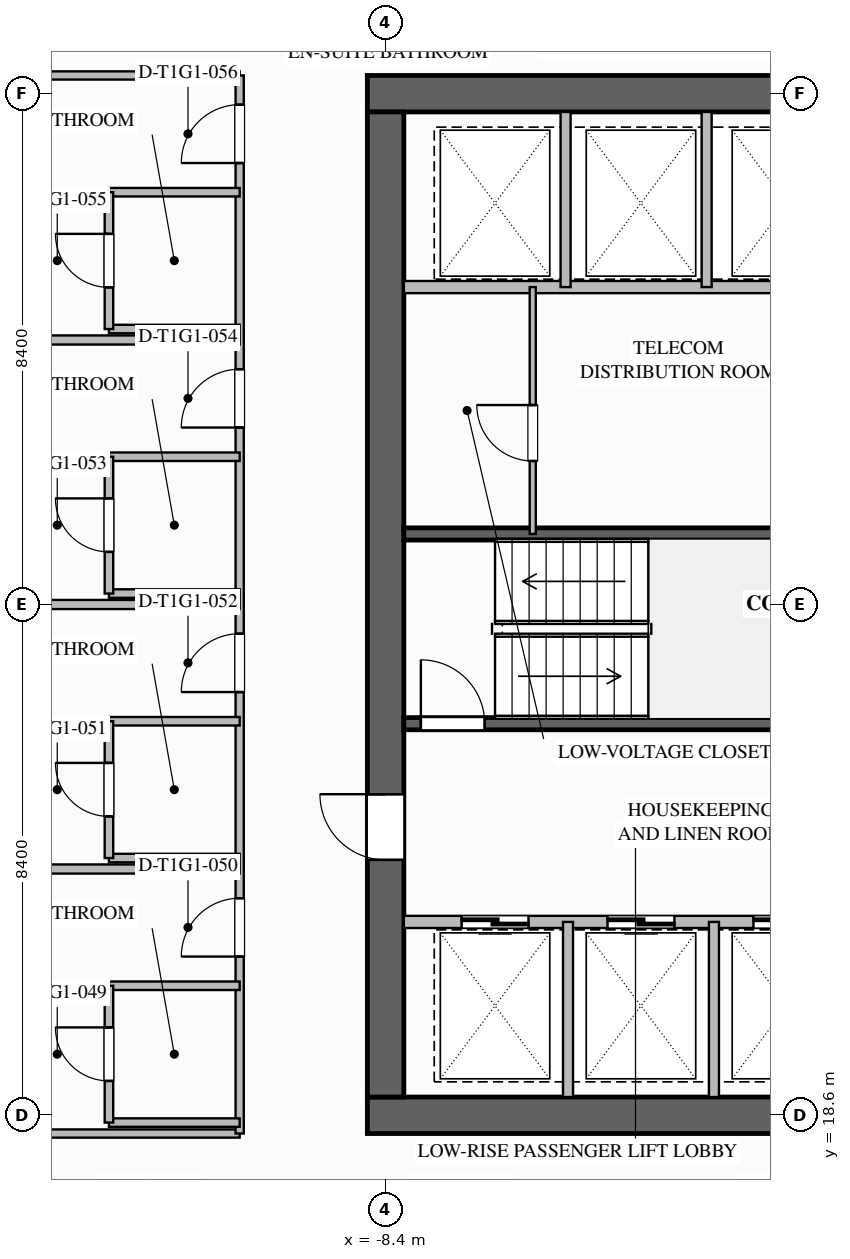
"""IFC4 building model, lengths in metres.
Left out: names, types, materials, properties, quantities, classifications, styles, units other than length and angle.
Written with IfcOpenShell. Run it as: python <this file> out.ifc"""

import sys

from ifc_helpers import new_model, si_unit, direction, frame, frame_2d, origin, place, context, subcontext, project, spatial, rectangle, extrude, element, fill, save


model = new_model("IFC4")
c1 = context("Model", 3, precision=1e-05, world=origin(), true_north=direction((0.0, 1.0)))
c2 = subcontext(c1, "Body", "Model", "MODEL_VIEW")
j1 = project(units=[si_unit("LENGTHUNIT", "METRE"), si_unit("PLANEANGLEUNIT", "RADIAN")], contexts=[c1])
p1 = place(None, origin())
s1 = spatial("IfcSite", under=j1, at=p1, CompositionType="ELEMENT")
p2 = place(p1, origin())
s2 = spatial("IfcBuilding", under=s1, at=p2, CompositionType="ELEMENT")
p3 = place(p2, frame((0.0, 0.0, 36.7)))
s3 = spatial("IfcBuildingStorey", under=s2, at=p3, CompositionType="ELEMENT", Elevation=36.7)
for number, where, z_axis, x_axis in (
    (1, (-8.7, 35.4, 0.0), (0.0, 0.0, 1.0), (1.0, 0.0, 0.0)),
    (2, (8.7, 18.6, 0.0), (0.0, 0.0, 1.0), (-1.0, 0.0, 0.0)),
):
    element("IfcWall", number, at=place(p3, frame(where, z_axis=z_axis, x_axis=x_axis)), inside=s3, PredefinedType="SHEAR", context=c2, shape_type="SweptSolid", body=[
        extrude(rectangle(XDim=17.4, YDim=0.6, at=frame_2d((8.7, 0.0))), origin(), (0.0, 0.0, 1.0), 3.5),
    ])
p4 = place(p3, frame((-8.4, 18.9, 0.0), z_axis=(0.0, 0.0, 1.0), x_axis=(0.0, 1.0, 0.0)))
e3 = element("IfcWall", 3, at=p4, inside=s3, PredefinedType="SHEAR", context=c2, shape_type="SweptSolid", body=[
    extrude(rectangle(XDim=16.2, YDim=0.6, at=frame_2d((8.1, 0.0))), origin(), (0.0, 0.0, 1.0), 3.5),
])
p5 = place(p4, frame((3.9, 0.0, 0.0)))
e4 = element("IfcOpeningElement", 4, at=p5, cuts=e3, PredefinedType="OPENING", context=c2, shape_type="SweptSolid", body=[
    extrude(rectangle(XDim=1.08, YDim=2.04, at=frame_2d((0.54, 1.02))), frame((0.0, 0.31, 0.0), z_axis=(0.0, -1.0, 0.0), x_axis=(1.0, 0.0, 0.0)), (0.0, 0.0, 1.0), 0.62),
])
p6 = place(p3, frame((-8.1, 25.04, 0.0), z_axis=(0.0, 0.0, 1.0), x_axis=(1.0, 0.0, 0.0)))
e5 = element("IfcWall", 5, at=p6, inside=s3, PredefinedType="SOLIDWALL", context=c2, shape_type="SweptSolid", body=[
    extrude(rectangle(XDim=8.1, YDim=0.2, at=frame_2d((4.05, 0.0))), origin(), (0.0, 0.0, 1.0), 3.24),
])
p7 = place(p6, frame((0.28, 0.0, 0.0)))
e6 = element("IfcOpeningElement", 6, at=p7, cuts=e5, PredefinedType="OPENING", context=c2, shape_type="SweptSolid", body=[
    extrude(rectangle(XDim=1.05, YDim=2.1, at=frame_2d((0.525, 1.05))), frame((0.0, 0.11, 0.0), z_axis=(0.0, -1.0, 0.0), x_axis=(1.0, 0.0, 0.0)), (0.0, 0.0, 1.0), 0.22),
])
p8 = place(p3, frame((-8.1, 28.16, 0.0), z_axis=(0.0, 0.0, 1.0), x_axis=(1.0, 0.0, 0.0)))
e7 = element("IfcWall", 7, at=p8, inside=s3, PredefinedType="SOLIDWALL", context=c2, shape_type="SweptSolid", body=[
    extrude(rectangle(XDim=8.1, YDim=0.2, at=frame_2d((4.05, 0.0))), origin(), (0.0, 0.0, 1.0), 3.24),
])
p9 = place(p3, frame((-8.1, 32.22, 0.0), z_axis=(0.0, 0.0, 1.0), x_axis=(1.0, 0.0, 0.0)))
e8 = element("IfcWall", 8, at=p9, inside=s3, PredefinedType="SOLIDWALL", context=c2, shape_type="SweptSolid", body=[
    extrude(rectangle(XDim=7.1, YDim=0.2, at=frame_2d((3.55, 0.0))), origin(), (0.0, 0.0, 1.0), 3.24),
])
for number, where, z_axis, x_axis in (
    (9, (-5.44, 32.22, 0.0), (0.0, 0.0, 1.0), (0.0, 1.0, 0.0)),
    (10, (-3.12, 32.22, 0.0), (0.0, 0.0, 1.0), (0.0, 1.0, 0.0)),
):
    element("IfcWall", number, at=place(p3, frame(where, z_axis=z_axis, x_axis=x_axis)), inside=s3, PredefinedType="PARTITIONING", context=c2, shape_type="SweptSolid", body=[
        extrude(rectangle(XDim=2.88, YDim=0.165, at=frame_2d((1.44, 0.0))), origin(), (0.0, 0.0, 1.0), 3.24),
    ])
p10 = place(p3, frame((-5.98, 28.16, 0.0), z_axis=(0.0, 0.0, 1.0), x_axis=(0.0, 1.0, 0.0)))
e11 = element("IfcWall", 11, at=p10, inside=s3, PredefinedType="PARTITIONING", context=c2, shape_type="SweptSolid", body=[
    extrude(rectangle(XDim=4.06, YDim=0.1, at=frame_2d((2.03, 0.0))), origin(), (0.0, 0.0, 1.0), 3.24),
])
p11 = place(p10, frame((1.2, 0.0, 0.0)))
e12 = element("IfcOpeningElement", 12, at=p11, cuts=e11, PredefinedType="OPENING", context=c2, shape_type="SweptSolid", body=[
    extrude(rectangle(XDim=0.92, YDim=2.1, at=frame_2d((0.46, 1.05))), frame((0.0, 0.06, 0.0), z_axis=(0.0, -1.0, 0.0), x_axis=(1.0, 0.0, 0.0)), (0.0, 0.0, 1.0), 0.12),
])
p12 = place(p3, frame((-0.55, 21.78, 0.0), z_axis=(0.0, 0.0, 1.0), x_axis=(-1.0, 0.0, 0.0)))
e13 = element("IfcWall", 13, at=p12, inside=s3, PredefinedType="SOLIDWALL", context=c2, shape_type="SweptSolid", body=[
    extrude(rectangle(XDim=7.55, YDim=0.2, at=frame_2d((3.775, 0.0))), origin(), (0.0, 0.0, 1.0), 3.24),
])
p13 = place(p12, frame((5.5, 0.0, 0.0)))
e14 = element("IfcOpeningElement", 14, at=p13, cuts=e13, PredefinedType="OPENING", context=c2, shape_type="SweptSolid", body=[
    extrude(rectangle(XDim=1.1, YDim=2.2, at=frame_2d((0.55, 1.1))), frame((0.0, 0.11, 0.0), z_axis=(0.0, -1.0, 0.0), x_axis=(1.0, 0.0, 0.0)), (0.0, 0.0, 1.0), 0.22),
])
p14 = place(p12, frame((3.1, 0.0, 0.0)))
e15 = element("IfcOpeningElement", 15, at=p14, cuts=e13, PredefinedType="OPENING", context=c2, shape_type="SweptSolid", body=[
    extrude(rectangle(XDim=1.1, YDim=2.2, at=frame_2d((0.55, 1.1))), frame((0.0, 0.11, 0.0), z_axis=(0.0, -1.0, 0.0), x_axis=(1.0, 0.0, 0.0)), (0.0, 0.0, 1.0), 0.22),
])
p15 = place(p12, frame((0.7, 0.0, 0.0)))
e16 = element("IfcOpeningElement", 16, at=p15, cuts=e13, PredefinedType="OPENING", context=c2, shape_type="SweptSolid", body=[
    extrude(rectangle(XDim=1.1, YDim=2.2, at=frame_2d((0.55, 1.1))), frame((0.0, 0.11, 0.0), z_axis=(0.0, -1.0, 0.0), x_axis=(1.0, 0.0, 0.0)), (0.0, 0.0, 1.0), 0.22),
])
for number, where, z_axis, x_axis in (
    (17, (-5.4, 18.9, 0.0), (0.0, 0.0, 1.0), (0.0, 1.0, 0.0)),
    (18, (-3.0, 18.9, 0.0), (0.0, 0.0, 1.0), (0.0, 1.0, 0.0)),
):
    element("IfcWall", number, at=place(p3, frame(where, z_axis=z_axis, x_axis=x_axis)), inside=s3, PredefinedType="PARTITIONING", context=c2, shape_type="SweptSolid", body=[
        extrude(rectangle(XDim=2.88, YDim=0.165, at=frame_2d((1.44, 0.0))), origin(), (0.0, 0.0, 1.0), 3.24),
    ])
for number, where, z_axis, x_axis in (
    (19, (-16.2, 18.3, 0.0), (0.0, 0.0, 1.0), (1.0, 0.0, 0.0)),
    (20, (-16.2, 35.7, 0.0), (0.0, 0.0, 1.0), (1.0, 0.0, 0.0)),
):
    element("IfcWall", number, at=place(p3, frame(where, z_axis=z_axis, x_axis=x_axis)), inside=s3, PredefinedType="PARTITIONING", context=c2, shape_type="SweptSolid", body=[
        extrude(rectangle(XDim=5.4, YDim=0.135, at=frame_2d((2.7, 0.0))), origin(), (0.0, 0.0, 1.0), 3.24),
    ])
p16 = place(p3, frame((-10.8, 18.3, 0.0), z_axis=(0.0, 0.0, 1.0), x_axis=(0.0, 1.0, 0.0)))
e21 = element("IfcWall", 21, at=p16, inside=s3, PredefinedType="PARTITIONING", context=c2, shape_type="SweptSolid", body=[
    extrude(rectangle(XDim=17.4, YDim=0.135, at=frame_2d((8.7, 0.0))), origin(), (0.0, 0.0, 1.0), 3.24),
])
p17 = place(p16, frame((2.91, 0.0, 0.0)))
e22 = element("IfcOpeningElement", 22, at=p17, cuts=e21, PredefinedType="OPENING", context=c2, shape_type="SweptSolid", body=[
    extrude(rectangle(XDim=0.96, YDim=2.15, at=frame_2d((0.48, 1.075))), frame((0.0, 0.077, 0.0), z_axis=(0.0, -1.0, 0.0), x_axis=(1.0, 0.0, 0.0)), (0.0, 0.0, 1.0), 0.155),
])
p18 = place(p16, frame((7.26, 0.0, 0.0)))
e23 = element("IfcOpeningElement", 23, at=p18, cuts=e21, PredefinedType="OPENING", context=c2, shape_type="SweptSolid", body=[
    extrude(rectangle(XDim=0.96, YDim=2.15, at=frame_2d((0.48, 1.075))), frame((0.0, 0.077, 0.0), z_axis=(0.0, -1.0, 0.0), x_axis=(1.0, 0.0, 0.0)), (0.0, 0.0, 1.0), 0.155),
])
p19 = place(p16, frame((11.61, 0.0, 0.0)))
e24 = element("IfcOpeningElement", 24, at=p19, cuts=e21, PredefinedType="OPENING", context=c2, shape_type="SweptSolid", body=[
    extrude(rectangle(XDim=0.96, YDim=2.15, at=frame_2d((0.48, 1.075))), frame((0.0, 0.077, 0.0), z_axis=(0.0, -1.0, 0.0), x_axis=(1.0, 0.0, 0.0)), (0.0, 0.0, 1.0), 0.155),
])
p20 = place(p16, frame((15.96, 0.0, 0.0)))
e25 = element("IfcOpeningElement", 25, at=p20, cuts=e21, PredefinedType="OPENING", context=c2, shape_type="SweptSolid", body=[
    extrude(rectangle(XDim=0.96, YDim=2.15, at=frame_2d((0.48, 1.075))), frame((0.0, 0.077, 0.0), z_axis=(0.0, -1.0, 0.0), x_axis=(1.0, 0.0, 0.0)), (0.0, 0.0, 1.0), 0.155),
])
p21 = place(p3, frame((-10.8, 18.48, 0.0), z_axis=(0.0, 0.0, 1.0), x_axis=(-1.0, 0.0, 0.0)))
e26 = element("IfcWall", 26, at=p21, inside=s3, PredefinedType="PLUMBINGWALL", context=c2, shape_type="SweptSolid", body=[
    extrude(rectangle(XDim=2.15, YDim=0.14, at=frame_2d((1.075, 0.0))), origin(), (0.0, 0.0, 1.0), 2.617),
])
p22 = place(p3, frame((-10.8, 20.73, 0.0), z_axis=(0.0, 0.0, 1.0), x_axis=(-1.0, 0.0, 0.0)))
e27 = element("IfcWall", 27, at=p22, inside=s3, PredefinedType="PLUMBINGWALL", context=c2, shape_type="SweptSolid", body=[
    extrude(rectangle(XDim=2.15, YDim=0.14, at=frame_2d((1.075, 0.0))), origin(), (0.0, 0.0, 1.0), 3.24),
])
p23 = place(p3, frame((-12.95, 18.48, 0.0), z_axis=(0.0, 0.0, 1.0), x_axis=(0.0, 1.0, 0.0)))
e28 = element("IfcWall", 28, at=p23, inside=s3, PredefinedType="PLUMBINGWALL", context=c2, shape_type="SweptSolid", body=[
    extrude(rectangle(XDim=2.25, YDim=0.14, at=frame_2d((1.125, 0.0))), origin(), (0.0, 0.0, 1.0), 3.24),
])
p24 = place(p23, frame((0.685, 0.0, 0.0)))
e29 = element("IfcOpeningElement", 29, at=p24, cuts=e28, PredefinedType="OPENING", context=c2, shape_type="SweptSolid", body=[
    extrude(rectangle(XDim=0.88, YDim=2.1, at=frame_2d((0.44, 1.05))), frame((0.0, 0.08, 0.0), z_axis=(0.0, -1.0, 0.0), x_axis=(1.0, 0.0, 0.0)), (0.0, 0.0, 1.0), 0.16),
])
p25 = place(p3, frame((-26.2, 22.65, 0.0), z_axis=(0.0, 0.0, 1.0), x_axis=(1.0, 0.0, 0.0)))
e30 = element("IfcWall", 30, at=p25, inside=s3, PredefinedType="PARTITIONING", context=c2, shape_type="SweptSolid", body=[
    extrude(rectangle(XDim=15.4, YDim=0.15, at=frame_2d((7.7, 0.0))), origin(), (0.0, 0.0, 1.0), 3.24),
])
for number, where, z_axis, x_axis in (
    (31, (-10.8, 22.83, 0.0), (0.0, 0.0, 1.0), (-1.0, 0.0, 0.0)),
    (32, (-10.8, 25.08, 0.0), (0.0, 0.0, 1.0), (-1.0, 0.0, 0.0)),
):
    element("IfcWall", number, at=place(p3, frame(where, z_axis=z_axis, x_axis=x_axis)), inside=s3, PredefinedType="PLUMBINGWALL", context=c2, shape_type="SweptSolid", body=[
        extrude(rectangle(XDim=2.15, YDim=0.14, at=frame_2d((1.075, 0.0))), origin(), (0.0, 0.0, 1.0), 3.24),
    ])
p26 = place(p3, frame((-12.95, 22.83, 0.0), z_axis=(0.0, 0.0, 1.0), x_axis=(0.0, 1.0, 0.0)))
e33 = element("IfcWall", 33, at=p26, inside=s3, PredefinedType="PLUMBINGWALL", context=c2, shape_type="SweptSolid", body=[
    extrude(rectangle(XDim=2.25, YDim=0.14, at=frame_2d((1.125, 0.0))), origin(), (0.0, 0.0, 1.0), 3.24),
])
p27 = place(p26, frame((0.685, 0.0, 0.0)))
e34 = element("IfcOpeningElement", 34, at=p27, cuts=e33, PredefinedType="OPENING", context=c2, shape_type="SweptSolid", body=[
    extrude(rectangle(XDim=0.88, YDim=2.1, at=frame_2d((0.44, 1.05))), frame((0.0, 0.08, 0.0), z_axis=(0.0, -1.0, 0.0), x_axis=(1.0, 0.0, 0.0)), (0.0, 0.0, 1.0), 0.16),
])
p28 = place(p3, frame((-26.2, 27.0, 0.0), z_axis=(0.0, 0.0, 1.0), x_axis=(1.0, 0.0, 0.0)))
e35 = element("IfcWall", 35, at=p28, inside=s3, PredefinedType="PARTITIONING", context=c2, shape_type="SweptSolid", body=[
    extrude(rectangle(XDim=15.4, YDim=0.15, at=frame_2d((7.7, 0.0))), origin(), (0.0, 0.0, 1.0), 2.298),
])
p29 = place(p3, frame((-10.8, 27.18, 0.0), z_axis=(0.0, 0.0, 1.0), x_axis=(-1.0, 0.0, 0.0)))
e36 = element("IfcWall", 36, at=p29, inside=s3, PredefinedType="PLUMBINGWALL", context=c2, shape_type="SweptSolid", body=[
    extrude(rectangle(XDim=2.15, YDim=0.14, at=frame_2d((1.075, 0.0))), origin(), (0.0, 0.0, 1.0), 2.617),
])
p30 = place(p3, frame((-10.8, 29.43, 0.0), z_axis=(0.0, 0.0, 1.0), x_axis=(-1.0, 0.0, 0.0)))
e37 = element("IfcWall", 37, at=p30, inside=s3, PredefinedType="PLUMBINGWALL", context=c2, shape_type="SweptSolid", body=[
    extrude(rectangle(XDim=2.15, YDim=0.14, at=frame_2d((1.075, 0.0))), origin(), (0.0, 0.0, 1.0), 3.24),
])
p31 = place(p3, frame((-12.95, 27.18, 0.0), z_axis=(0.0, 0.0, 1.0), x_axis=(0.0, 1.0, 0.0)))
e38 = element("IfcWall", 38, at=p31, inside=s3, PredefinedType="PLUMBINGWALL", context=c2, shape_type="SweptSolid", body=[
    extrude(rectangle(XDim=2.25, YDim=0.14, at=frame_2d((1.125, 0.0))), origin(), (0.0, 0.0, 1.0), 3.24),
])
p32 = place(p31, frame((0.685, 0.0, 0.0)))
e39 = element("IfcOpeningElement", 39, at=p32, cuts=e38, PredefinedType="OPENING", context=c2, shape_type="SweptSolid", body=[
    extrude(rectangle(XDim=0.88, YDim=2.1, at=frame_2d((0.44, 1.05))), frame((0.0, 0.08, 0.0), z_axis=(0.0, -1.0, 0.0), x_axis=(1.0, 0.0, 0.0)), (0.0, 0.0, 1.0), 0.16),
])
p33 = place(p3, frame((-26.2, 31.35, 0.0), z_axis=(0.0, 0.0, 1.0), x_axis=(1.0, 0.0, 0.0)))
e40 = element("IfcWall", 40, at=p33, inside=s3, PredefinedType="PARTITIONING", context=c2, shape_type="SweptSolid", body=[
    extrude(rectangle(XDim=15.4, YDim=0.15, at=frame_2d((7.7, 0.0))), origin(), (0.0, 0.0, 1.0), 3.24),
])
for number, where, z_axis, x_axis in (
    (41, (-10.8, 31.53, 0.0), (0.0, 0.0, 1.0), (-1.0, 0.0, 0.0)),
    (42, (-10.8, 33.78, 0.0), (0.0, 0.0, 1.0), (-1.0, 0.0, 0.0)),
):
    element("IfcWall", number, at=place(p3, frame(where, z_axis=z_axis, x_axis=x_axis)), inside=s3, PredefinedType="PLUMBINGWALL", context=c2, shape_type="SweptSolid", body=[
        extrude(rectangle(XDim=2.15, YDim=0.14, at=frame_2d((1.075, 0.0))), origin(), (0.0, 0.0, 1.0), 3.24),
    ])
p34 = place(p3, frame((-12.95, 31.53, 0.0), z_axis=(0.0, 0.0, 1.0), x_axis=(0.0, 1.0, 0.0)))
e43 = element("IfcWall", 43, at=p34, inside=s3, PredefinedType="PLUMBINGWALL", context=c2, shape_type="SweptSolid", body=[
    extrude(rectangle(XDim=2.25, YDim=0.14, at=frame_2d((1.125, 0.0))), origin(), (0.0, 0.0, 1.0), 3.24),
])
p35 = place(p34, frame((0.685, 0.0, 0.0)))
e44 = element("IfcOpeningElement", 44, at=p35, cuts=e43, PredefinedType="OPENING", context=c2, shape_type="SweptSolid", body=[
    extrude(rectangle(XDim=0.88, YDim=2.1, at=frame_2d((0.44, 1.05))), frame((0.0, 0.08, 0.0), z_axis=(0.0, -1.0, 0.0), x_axis=(1.0, 0.0, 0.0)), (0.0, 0.0, 1.0), 0.16),
])
p36 = place(p7, origin())
e45 = element("IfcDoor", 45, at=p36, inside=s3, OperationType="SINGLE_SWING_LEFT", PredefinedType="DOOR", context=c2, shape_type="SweptSolid", body=[
    extrude(rectangle(XDim=1.05, YDim=2.1, at=frame_2d((0.525, 1.05))), frame((0.0, 0.025, 0.0), z_axis=(0.0, -1.0, 0.0), x_axis=(1.0, 0.0, 0.0)), (0.0, 0.0, 1.0), 0.05),
])
fill(e6, e45)
p37 = place(p11, origin())
e46 = element("IfcDoor", 46, at=p37, inside=s3, OperationType="SINGLE_SWING_RIGHT", PredefinedType="DOOR", context=c2, shape_type="SweptSolid", body=[
    extrude(rectangle(XDim=0.92, YDim=2.1, at=frame_2d((0.46, 1.05))), frame((0.0, 0.025, 0.0), z_axis=(0.0, -1.0, 0.0), x_axis=(1.0, 0.0, 0.0)), (0.0, 0.0, 1.0), 0.05),
])
fill(e12, e46)
p38 = place(p13, origin())
e47 = element("IfcDoor", 47, at=p38, inside=s3, OperationType="SLIDING_TO_LEFT", PredefinedType="DOOR", context=c2, shape_type="SweptSolid", body=[
    extrude(rectangle(XDim=1.1, YDim=2.2, at=frame_2d((0.55, 1.1))), frame((0.0, 0.025, 0.0), z_axis=(0.0, -1.0, 0.0), x_axis=(1.0, 0.0, 0.0)), (0.0, 0.0, 1.0), 0.05),
])
fill(e14, e47)
p39 = place(p14, origin())
e48 = element("IfcDoor", 48, at=p39, inside=s3, OperationType="SLIDING_TO_LEFT", PredefinedType="DOOR", context=c2, shape_type="SweptSolid", body=[
    extrude(rectangle(XDim=1.1, YDim=2.2, at=frame_2d((0.55, 1.1))), frame((0.0, 0.025, 0.0), z_axis=(0.0, -1.0, 0.0), x_axis=(1.0, 0.0, 0.0)), (0.0, 0.0, 1.0), 0.05),
])
fill(e15, e48)
p40 = place(p15, origin())
e49 = element("IfcDoor", 49, at=p40, inside=s3, OperationType="SLIDING_TO_LEFT", PredefinedType="DOOR", context=c2, shape_type="SweptSolid", body=[
    extrude(rectangle(XDim=1.1, YDim=2.2, at=frame_2d((0.55, 1.1))), frame((0.0, 0.025, 0.0), z_axis=(0.0, -1.0, 0.0), x_axis=(1.0, 0.0, 0.0)), (0.0, 0.0, 1.0), 0.05),
])
fill(e16, e49)
p41 = place(p5, origin())
e50 = element("IfcDoor", 50, at=p41, inside=s3, OperationType="SINGLE_SWING_RIGHT", PredefinedType="DOOR", context=c2, shape_type="SweptSolid", body=[
    extrude(rectangle(XDim=1.08, YDim=2.04, at=frame_2d((0.54, 1.02))), frame((0.0, 0.025, 0.0), z_axis=(0.0, -1.0, 0.0), x_axis=(1.0, 0.0, 0.0)), (0.0, 0.0, 1.0), 0.05),
])
fill(e4, e50)
p42 = place(p24, origin())
e51 = element("IfcDoor", 51, at=p42, inside=s3, OperationType="SINGLE_SWING_RIGHT", PredefinedType="DOOR", context=c2, shape_type="SweptSolid", body=[
    extrude(rectangle(XDim=0.88, YDim=2.1, at=frame_2d((0.44, 1.05))), frame((0.0, 0.025, 0.0), z_axis=(0.0, -1.0, 0.0), x_axis=(1.0, 0.0, 0.0)), (0.0, 0.0, 1.0), 0.05),
])
fill(e29, e51)
p43 = place(p17, origin())
e52 = element("IfcDoor", 52, at=p43, inside=s3, OperationType="SINGLE_SWING_LEFT", PredefinedType="DOOR", context=c2, shape_type="SweptSolid", body=[
    extrude(rectangle(XDim=0.96, YDim=2.15, at=frame_2d((0.48, 1.075))), frame((0.0, 0.025, 0.0), z_axis=(0.0, -1.0, 0.0), x_axis=(1.0, 0.0, 0.0)), (0.0, 0.0, 1.0), 0.05),
])
fill(e22, e52)
p44 = place(p27, origin())
e53 = element("IfcDoor", 53, at=p44, inside=s3, OperationType="SINGLE_SWING_RIGHT", PredefinedType="DOOR", context=c2, shape_type="SweptSolid", body=[
    extrude(rectangle(XDim=0.88, YDim=2.1, at=frame_2d((0.44, 1.05))), frame((0.0, 0.025, 0.0), z_axis=(0.0, -1.0, 0.0), x_axis=(1.0, 0.0, 0.0)), (0.0, 0.0, 1.0), 0.05),
])
fill(e34, e53)
p45 = place(p18, origin())
e54 = element("IfcDoor", 54, at=p45, inside=s3, OperationType="SINGLE_SWING_LEFT", PredefinedType="DOOR", context=c2, shape_type="SweptSolid", body=[
    extrude(rectangle(XDim=0.96, YDim=2.15, at=frame_2d((0.48, 1.075))), frame((0.0, 0.025, 0.0), z_axis=(0.0, -1.0, 0.0), x_axis=(1.0, 0.0, 0.0)), (0.0, 0.0, 1.0), 0.05),
])
fill(e23, e54)
p46 = place(p32, origin())
e55 = element("IfcDoor", 55, at=p46, inside=s3, OperationType="SINGLE_SWING_RIGHT", PredefinedType="DOOR", context=c2, shape_type="SweptSolid", body=[
    extrude(rectangle(XDim=0.88, YDim=2.1, at=frame_2d((0.44, 1.05))), frame((0.0, 0.025, 0.0), z_axis=(0.0, -1.0, 0.0), x_axis=(1.0, 0.0, 0.0)), (0.0, 0.0, 1.0), 0.05),
])
fill(e39, e55)
p47 = place(p19, origin())
e56 = element("IfcDoor", 56, at=p47, inside=s3, OperationType="SINGLE_SWING_LEFT", PredefinedType="DOOR", context=c2, shape_type="SweptSolid", body=[
    extrude(rectangle(XDim=0.96, YDim=2.15, at=frame_2d((0.48, 1.075))), frame((0.0, 0.025, 0.0), z_axis=(0.0, -1.0, 0.0), x_axis=(1.0, 0.0, 0.0)), (0.0, 0.0, 1.0), 0.05),
])
fill(e24, e56)
p48 = place(p35, origin())
e57 = element("IfcDoor", 57, at=p48, inside=s3, OperationType="SINGLE_SWING_RIGHT", PredefinedType="DOOR", context=c2, shape_type="SweptSolid", body=[
    extrude(rectangle(XDim=0.88, YDim=2.1, at=frame_2d((0.44, 1.05))), frame((0.0, 0.025, 0.0), z_axis=(0.0, -1.0, 0.0), x_axis=(1.0, 0.0, 0.0)), (0.0, 0.0, 1.0), 0.05),
])
fill(e44, e57)
p49 = place(p20, origin())
e58 = element("IfcDoor", 58, at=p49, inside=s3, OperationType="SINGLE_SWING_LEFT", PredefinedType="DOOR", context=c2, shape_type="SweptSolid", body=[
    extrude(rectangle(XDim=0.96, YDim=2.15, at=frame_2d((0.48, 1.075))), frame((0.0, 0.025, 0.0), z_axis=(0.0, -1.0, 0.0), x_axis=(1.0, 0.0, 0.0)), (0.0, 0.0, 1.0), 0.05),
])
fill(e25, e58)
save(model, sys.argv[1])
